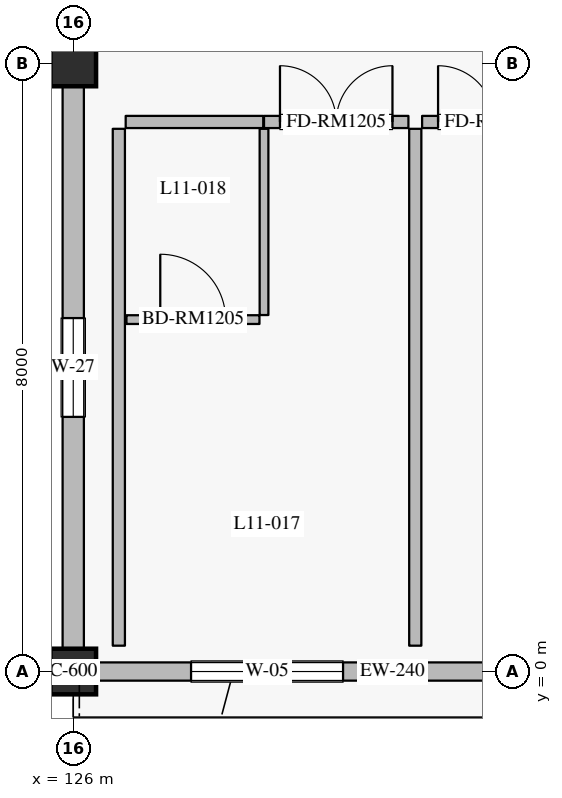
"""IFC4 building model, lengths in metres.
Left out: names, types, materials, properties, quantities, classifications, styles, units other than length and angle.
Written with IfcOpenShell. Run it as: python <this file> out.ifc"""

import sys

from ifc_helpers import new_model, si_unit, direction, frame, frame_2d, origin, origin_2d, place, context, subcontext, project, spatial, rectangle, extrude, element, fill, save


model = new_model("IFC4")
c1 = context("Model", 3, precision=1e-05, world=origin(), true_north=direction((0.0, 1.0)))
c2 = subcontext(c1, "Body", "Model", "MODEL_VIEW")
j1 = project(units=[si_unit("LENGTHUNIT", "METRE"), si_unit("PLANEANGLEUNIT", "RADIAN")], contexts=[c1])
p1 = place(None, origin())
s1 = spatial("IfcSite", under=j1, at=p1, CompositionType="ELEMENT")
p2 = place(p1, origin())
s2 = spatial("IfcBuilding", under=s1, at=p2, CompositionType="ELEMENT")
p3 = place(p2, frame((0.0, 0.0, 47.4)))
s3 = spatial("IfcBuildingStorey", under=s2, at=p3, CompositionType="ELEMENT", Elevation=47.4)
for number, where, z_axis, x_axis in (
    (1, (126.0, 0.0, 0.0), (0.0, 0.0, 1.0), (1.0, 0.0, 0.0)),
    (2, (126.0, 8.0, 0.0), (0.0, 0.0, 1.0), (1.0, 0.0, 0.0)),
):
    element("IfcColumn", number, at=place(p3, frame(where, z_axis=z_axis, x_axis=x_axis)), inside=s3, PredefinedType="COLUMN", context=c2, shape_type="SweptSolid", body=[
        extrude(rectangle(XDim=0.6, YDim=0.6, at=origin_2d()), origin(), (0.0, 0.0, 1.0), 4.2),
    ])
p4 = place(p3, frame((134.1, 0.0, 0.0), z_axis=(0.0, 0.0, 1.0), x_axis=(-1.0, 0.0, 0.0)))
e3 = element("IfcWall", 3, at=p4, inside=s3, PredefinedType="SOLIDWALL", context=c2, shape_type="SweptSolid", body=[
    extrude(rectangle(XDim=7.8, YDim=0.24, at=frame_2d((3.9, 0.0))), origin(), (0.0, 0.0, 1.0), 3.49),
])
p5 = place(p4, frame((1.0, 0.0, 0.0)))
e4 = element("IfcOpeningElement", 4, at=p5, cuts=e3, PredefinedType="OPENING", context=c2, shape_type="SweptSolid", body=[
    extrude(rectangle(XDim=1.5, YDim=2.25, at=frame_2d((0.75, 1.125))), frame((0.0, 0.13, 0.0), z_axis=(0.0, -1.0, 0.0), x_axis=(1.0, 0.0, 0.0)), (0.0, 0.0, 1.0), 0.26),
])
p6 = place(p4, frame((4.55, 0.0, 0.8)))
e5 = element("IfcOpeningElement", 5, at=p6, cuts=e3, PredefinedType="OPENING", context=c2, shape_type="SweptSolid", body=[
    extrude(rectangle(XDim=2.0, YDim=1.75, at=frame_2d((1.0, 0.875))), frame((0.0, 0.13, 0.0), z_axis=(0.0, -1.0, 0.0), x_axis=(1.0, 0.0, 0.0)), (0.0, 0.0, 1.0), 0.26),
])
p7 = place(p3, frame((126.0, 0.3, 0.0), z_axis=(0.0, 0.0, 1.0), x_axis=(0.0, 1.0, 0.0)))
e6 = element("IfcWall", 6, at=p7, inside=s3, PredefinedType="SOLIDWALL", context=c2, shape_type="SweptSolid", body=[
    extrude(rectangle(XDim=7.4, YDim=0.28, at=frame_2d((3.7, 0.0))), origin(), (0.0, 0.0, 1.0), 3.3),
])
p8 = place(p7, frame((3.05, 0.0, 0.75)))
e7 = element("IfcOpeningElement", 7, at=p8, cuts=e6, PredefinedType="OPENING", context=c2, shape_type="SweptSolid", body=[
    extrude(rectangle(XDim=1.3, YDim=1.65, at=frame_2d((0.65, 0.825))), frame((0.0, 0.15, 0.0), z_axis=(0.0, -1.0, 0.0), x_axis=(1.0, 0.0, 0.0)), (0.0, 0.0, 1.0), 0.3),
])
p9 = place(p3, frame((126.69, 7.23, 0.0), z_axis=(0.0, 0.0, 1.0), x_axis=(1.0, 0.0, 0.0)))
e8 = element("IfcWall", 8, at=p9, inside=s3, PredefinedType="PARTITIONING", context=c2, shape_type="SweptSolid", body=[
    extrude(rectangle(XDim=1.81, YDim=0.16, at=frame_2d((0.905, 0.0))), origin(), (0.0, 0.0, 1.0), 3.935),
])
p10 = place(p3, frame((128.51, 7.23, 0.0), z_axis=(0.0, 0.0, 1.0), x_axis=(1.0, 0.0, 0.0)))
e9 = element("IfcWall", 9, at=p10, inside=s3, PredefinedType="PARTITIONING", context=c2, shape_type="SweptSolid", body=[
    extrude(rectangle(XDim=1.9, YDim=0.16, at=frame_2d((0.95, 0.0))), origin(), (0.0, 0.0, 1.0), 3.935),
])
p11 = place(p10, frame((0.21, 0.0, 0.0)))
e10 = element("IfcOpeningElement", 10, at=p11, cuts=e9, PredefinedType="OPENING", context=c2, shape_type="SweptSolid", body=[
    extrude(rectangle(XDim=1.48, YDim=2.35, at=frame_2d((0.74, 1.175))), frame((0.0, 0.09, 0.0), z_axis=(0.0, -1.0, 0.0), x_axis=(1.0, 0.0, 0.0)), (0.0, 0.0, 1.0), 0.18),
])
p12 = place(p3, frame((128.51, 4.69, 0.0), z_axis=(0.0, 0.0, 1.0), x_axis=(0.0, 1.0, 0.0)))
e11 = element("IfcWall", 11, at=p12, inside=s3, PredefinedType="PARTITIONING", context=c2, shape_type="SweptSolid", body=[
    extrude(rectangle(XDim=2.45, YDim=0.115, at=frame_2d((1.225, 0.0))), origin(), (0.0, 0.0, 1.0), 3.935),
])
p13 = place(p3, frame((126.7, 4.63, 0.0), z_axis=(0.0, 0.0, 1.0), x_axis=(1.0, 0.0, 0.0)))
e12 = element("IfcWall", 12, at=p13, inside=s3, PredefinedType="PARTITIONING", context=c2, shape_type="SweptSolid", body=[
    extrude(rectangle(XDim=1.75, YDim=0.115, at=frame_2d((0.875, 0.0))), origin(), (0.0, 0.0, 1.0), 3.935),
])
p14 = place(p13, frame((0.445, 0.0, 0.0)))
e13 = element("IfcOpeningElement", 13, at=p14, cuts=e12, PredefinedType="OPENING", context=c2, shape_type="SweptSolid", body=[
    extrude(rectangle(XDim=0.86, YDim=2.12, at=frame_2d((0.43, 1.06))), frame((0.0, 0.067, 0.0), z_axis=(0.0, -1.0, 0.0), x_axis=(1.0, 0.0, 0.0)), (0.0, 0.0, 1.0), 0.135),
])
p15 = place(p3, frame((126.6, 0.34, 0.0), z_axis=(0.0, 0.0, 1.0), x_axis=(0.0, 1.0, 0.0)))
e14 = element("IfcWall", 14, at=p15, inside=s3, PredefinedType="PARTITIONING", context=c2, shape_type="SweptSolid", body=[
    extrude(rectangle(XDim=6.8, YDim=0.16, at=frame_2d((3.4, 0.0))), origin(), (0.0, 0.0, 1.0), 3.935),
])
p16 = place(p3, frame((130.59, 7.23, 0.0), z_axis=(0.0, 0.0, 1.0), x_axis=(1.0, 0.0, 0.0)))
e15 = element("IfcWall", 15, at=p16, inside=s3, PredefinedType="PARTITIONING", context=c2, shape_type="SweptSolid", body=[
    extrude(rectangle(XDim=1.9, YDim=0.16, at=frame_2d((0.95, 0.0))), origin(), (0.0, 0.0, 1.0), 3.935),
])
p17 = place(p16, frame((0.21, 0.0, 0.0)))
e16 = element("IfcOpeningElement", 16, at=p17, cuts=e15, PredefinedType="OPENING", context=c2, shape_type="SweptSolid", body=[
    extrude(rectangle(XDim=1.48, YDim=2.35, at=frame_2d((0.74, 1.175))), frame((0.0, 0.09, 0.0), z_axis=(0.0, -1.0, 0.0), x_axis=(1.0, 0.0, 0.0)), (0.0, 0.0, 1.0), 0.18),
])
p18 = place(p3, frame((130.5, 0.34, 0.0), z_axis=(0.0, 0.0, 1.0), x_axis=(0.0, 1.0, 0.0)))
e17 = element("IfcWall", 17, at=p18, inside=s3, PredefinedType="PARTITIONING", context=c2, shape_type="SweptSolid", body=[
    extrude(rectangle(XDim=6.8, YDim=0.16, at=frame_2d((3.4, 0.0))), origin(), (0.0, 0.0, 1.0), 3.935),
])
p19 = place(p6, origin())
e18 = element("IfcWindow", 18, at=p19, inside=s3, PartitioningType="DOUBLE_PANEL_VERTICAL", PredefinedType="WINDOW", context=c2, shape_type="SweptSolid", body=[
    extrude(rectangle(XDim=2.0, YDim=1.75, at=frame_2d((1.0, 0.875))), frame((0.0, 0.03, 0.0), z_axis=(0.0, -1.0, 0.0), x_axis=(1.0, 0.0, 0.0)), (0.0, 0.0, 1.0), 0.06),
])
fill(e5, e18)
p20 = place(p8, origin())
e19 = element("IfcWindow", 19, at=p20, inside=s3, PartitioningType="SINGLE_PANEL", PredefinedType="WINDOW", context=c2, shape_type="SweptSolid", body=[
    extrude(rectangle(XDim=1.3, YDim=1.65, at=frame_2d((0.65, 0.825))), frame((0.0, 0.03, 0.0), z_axis=(0.0, -1.0, 0.0), x_axis=(1.0, 0.0, 0.0)), (0.0, 0.0, 1.0), 0.06),
])
fill(e7, e19)
p21 = place(p11, origin())
e20 = element("IfcDoor", 20, at=p21, inside=s3, OperationType="DOUBLE_DOOR_SINGLE_SWING", PredefinedType="DOOR", context=c2, shape_type="SweptSolid", body=[
    extrude(rectangle(XDim=1.48, YDim=2.35, at=frame_2d((0.74, 1.175))), frame((0.0, 0.025, 0.0), z_axis=(0.0, -1.0, 0.0), x_axis=(1.0, 0.0, 0.0)), (0.0, 0.0, 1.0), 0.05),
])
fill(e10, e20)
p22 = place(p14, origin())
e21 = element("IfcDoor", 21, at=p22, inside=s3, OperationType="SINGLE_SWING_LEFT", PredefinedType="DOOR", context=c2, shape_type="SweptSolid", body=[
    extrude(rectangle(XDim=0.86, YDim=2.12, at=frame_2d((0.43, 1.06))), frame((0.0, 0.025, 0.0), z_axis=(0.0, -1.0, 0.0), x_axis=(1.0, 0.0, 0.0)), (0.0, 0.0, 1.0), 0.05),
])
fill(e13, e21)
p23 = place(p17, origin())
e22 = element("IfcDoor", 22, at=p23, inside=s3, OperationType="DOUBLE_DOOR_SINGLE_SWING", PredefinedType="DOOR", context=c2, shape_type="SweptSolid", body=[
    extrude(rectangle(XDim=1.48, YDim=2.35, at=frame_2d((0.74, 1.175))), frame((0.0, 0.025, 0.0), z_axis=(0.0, -1.0, 0.0), x_axis=(1.0, 0.0, 0.0)), (0.0, 0.0, 1.0), 0.05),
])
fill(e16, e22)
save(model, sys.argv[1])
